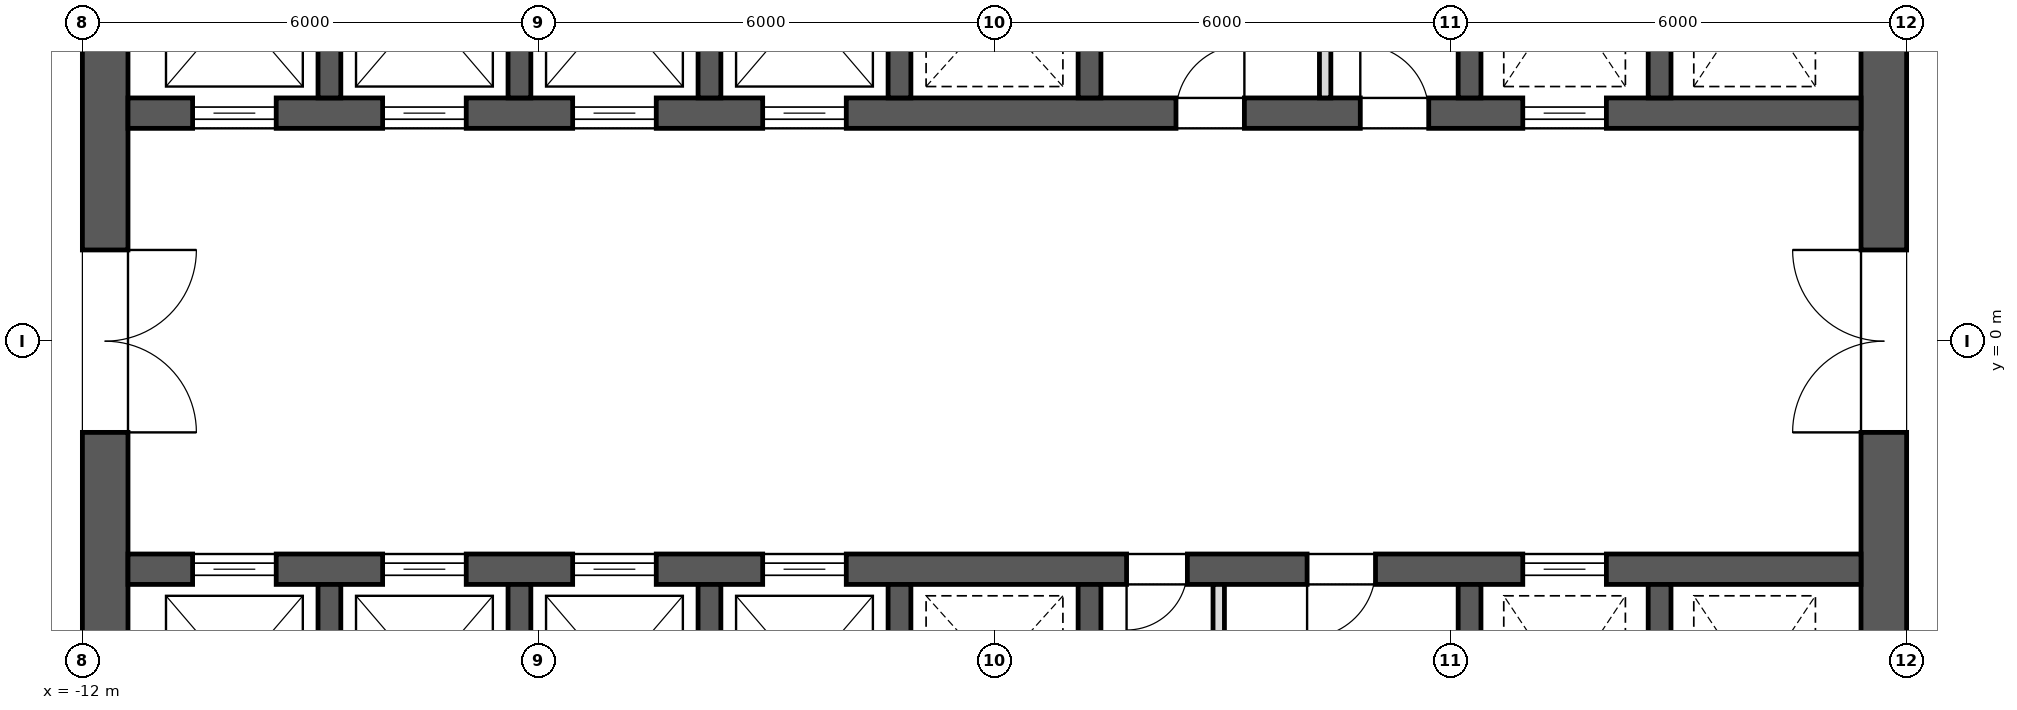
"""IFC4 building model, lengths in metres.
Left out: names, types, materials, properties, quantities, classifications, styles, units other than length and angle.
Written with IfcOpenShell. Run it as: python <this file> out.ifc"""

import sys

from ifc_helpers import new_model, si_unit, direction, frame, frame_2d, origin, place, context, subcontext, project, spatial, rectangle, extrude, element, fill, save


model = new_model("IFC4")
c1 = context("Model", 3, precision=1e-05, world=origin(), true_north=direction((0.0, 1.0)))
c2 = subcontext(c1, "Body", "Model", "MODEL_VIEW")
j1 = project(units=[si_unit("LENGTHUNIT", "METRE"), si_unit("PLANEANGLEUNIT", "RADIAN")], contexts=[c1])
p1 = place(None, origin())
s1 = spatial("IfcSite", under=j1, at=p1, CompositionType="ELEMENT")
p2 = place(p1, origin())
s2 = spatial("IfcBuilding", under=s1, at=p2, CompositionType="ELEMENT")
p3 = place(p2, frame((0.0, 0.0, 222.9)))
s3 = spatial("IfcBuildingStorey", under=s2, at=p3, CompositionType="ELEMENT", Elevation=222.9)
p4 = place(p3, frame((11.7, -11.4, 0.0), z_axis=(0.0, 0.0, 1.0), x_axis=(0.0, 1.0, 0.0)))
e1 = element("IfcWall", 1, at=p4, inside=s3, PredefinedType="SHEAR", context=c2, shape_type="SweptSolid", body=[
    extrude(rectangle(XDim=22.8, YDim=0.6, at=frame_2d((11.4, 0.0))), origin(), (0.0, 0.0, 1.0), 4.0),
])
p5 = place(p4, frame((10.2, 0.0, 0.0)))
e2 = element("IfcOpeningElement", 2, at=p5, cuts=e1, PredefinedType="OPENING", context=c2, shape_type="SweptSolid", body=[
    extrude(rectangle(XDim=2.4, YDim=2.1, at=frame_2d((1.2, 1.05))), frame((0.0, 0.312, 0.0), z_axis=(0.0, -1.0, 0.0), x_axis=(1.0, 0.0, 0.0)), (0.0, 0.0, 1.0), 0.624),
])
p6 = place(p4, frame((19.5, 0.0, 0.0)))
e3 = element("IfcOpeningElement", 3, at=p6, cuts=e1, PredefinedType="OPENING", context=c2, shape_type="SweptSolid", body=[
    extrude(rectangle(XDim=1.2, YDim=2.1, at=frame_2d((0.6, 1.05))), frame((0.0, 0.312, 0.0), z_axis=(0.0, -1.0, 0.0), x_axis=(1.0, 0.0, 0.0)), (0.0, 0.0, 1.0), 0.624),
])
p7 = place(p4, frame((2.1, 0.0, 0.0)))
e4 = element("IfcOpeningElement", 4, at=p7, cuts=e1, PredefinedType="OPENING", context=c2, shape_type="SweptSolid", body=[
    extrude(rectangle(XDim=1.2, YDim=2.1, at=frame_2d((0.6, 1.05))), frame((0.0, 0.312, 0.0), z_axis=(0.0, -1.0, 0.0), x_axis=(1.0, 0.0, 0.0)), (0.0, 0.0, 1.0), 0.624),
])
p8 = place(p3, frame((-11.7, -11.4, 0.0), z_axis=(0.0, 0.0, 1.0), x_axis=(0.0, 1.0, 0.0)))
e5 = element("IfcWall", 5, at=p8, inside=s3, PredefinedType="SHEAR", context=c2, shape_type="SweptSolid", body=[
    extrude(rectangle(XDim=22.8, YDim=0.6, at=frame_2d((11.4, 0.0))), origin(), (0.0, 0.0, 1.0), 4.0),
])
p9 = place(p8, frame((10.2, 0.0, 0.0)))
e6 = element("IfcOpeningElement", 6, at=p9, cuts=e5, PredefinedType="OPENING", context=c2, shape_type="SweptSolid", body=[
    extrude(rectangle(XDim=2.4, YDim=2.1, at=frame_2d((1.2, 1.05))), frame((0.0, 0.312, 0.0), z_axis=(0.0, -1.0, 0.0), x_axis=(1.0, 0.0, 0.0)), (0.0, 0.0, 1.0), 0.624),
])
p10 = place(p8, frame((18.925, 0.0, 0.0)))
e7 = element("IfcOpeningElement", 7, at=p10, cuts=e5, PredefinedType="OPENING", context=c2, shape_type="SweptSolid", body=[
    extrude(rectangle(XDim=1.2, YDim=2.1, at=frame_2d((0.6, 1.05))), frame((0.0, 0.312, 0.0), z_axis=(0.0, -1.0, 0.0), x_axis=(1.0, 0.0, 0.0)), (0.0, 0.0, 1.0), 0.624),
])
p11 = place(p8, frame((2.675, 0.0, 0.0)))
e8 = element("IfcOpeningElement", 8, at=p11, cuts=e5, PredefinedType="OPENING", context=c2, shape_type="SweptSolid", body=[
    extrude(rectangle(XDim=1.2, YDim=2.1, at=frame_2d((0.6, 1.05))), frame((0.0, 0.312, 0.0), z_axis=(0.0, -1.0, 0.0), x_axis=(1.0, 0.0, 0.0)), (0.0, 0.0, 1.0), 0.624),
])
p12 = place(p3, frame((-11.4, 3.0, 0.0), z_axis=(0.0, 0.0, 1.0), x_axis=(1.0, 0.0, 0.0)))
e9 = element("IfcWall", 9, at=p12, inside=s3, PredefinedType="SHEAR", context=c2, shape_type="SweptSolid", body=[
    extrude(rectangle(XDim=22.8, YDim=0.4, at=frame_2d((11.4, 0.0))), origin(), (0.0, 0.0, 1.0), 4.0),
])
p13 = place(p12, frame((0.85, 0.0, 0.0)))
e10 = element("IfcOpeningElement", 10, at=p13, cuts=e9, PredefinedType="OPENING", context=c2, shape_type="SweptSolid", body=[
    extrude(rectangle(XDim=1.1, YDim=2.1, at=frame_2d((0.55, 1.05))), frame((0.0, 0.212, 0.0), z_axis=(0.0, -1.0, 0.0), x_axis=(1.0, 0.0, 0.0)), (0.0, 0.0, 1.0), 0.424),
])
p14 = place(p12, frame((3.35, 0.0, 0.0)))
e11 = element("IfcOpeningElement", 11, at=p14, cuts=e9, PredefinedType="OPENING", context=c2, shape_type="SweptSolid", body=[
    extrude(rectangle(XDim=1.1, YDim=2.1, at=frame_2d((0.55, 1.05))), frame((0.0, 0.212, 0.0), z_axis=(0.0, -1.0, 0.0), x_axis=(1.0, 0.0, 0.0)), (0.0, 0.0, 1.0), 0.424),
])
p15 = place(p12, frame((5.85, 0.0, 0.0)))
e12 = element("IfcOpeningElement", 12, at=p15, cuts=e9, PredefinedType="OPENING", context=c2, shape_type="SweptSolid", body=[
    extrude(rectangle(XDim=1.1, YDim=2.1, at=frame_2d((0.55, 1.05))), frame((0.0, 0.212, 0.0), z_axis=(0.0, -1.0, 0.0), x_axis=(1.0, 0.0, 0.0)), (0.0, 0.0, 1.0), 0.424),
])
p16 = place(p12, frame((8.35, 0.0, 0.0)))
e13 = element("IfcOpeningElement", 13, at=p16, cuts=e9, PredefinedType="OPENING", context=c2, shape_type="SweptSolid", body=[
    extrude(rectangle(XDim=1.1, YDim=2.1, at=frame_2d((0.55, 1.05))), frame((0.0, 0.212, 0.0), z_axis=(0.0, -1.0, 0.0), x_axis=(1.0, 0.0, 0.0)), (0.0, 0.0, 1.0), 0.424),
])
p17 = place(p12, frame((18.35, 0.0, 0.0)))
e14 = element("IfcOpeningElement", 14, at=p17, cuts=e9, PredefinedType="OPENING", context=c2, shape_type="SweptSolid", body=[
    extrude(rectangle(XDim=1.1, YDim=2.1, at=frame_2d((0.55, 1.05))), frame((0.0, 0.212, 0.0), z_axis=(0.0, -1.0, 0.0), x_axis=(1.0, 0.0, 0.0)), (0.0, 0.0, 1.0), 0.424),
])
p18 = place(p12, frame((13.788, 0.0, 0.0)))
e15 = element("IfcOpeningElement", 15, at=p18, cuts=e9, PredefinedType="OPENING", context=c2, shape_type="SweptSolid", body=[
    extrude(rectangle(XDim=0.9, YDim=2.1, at=frame_2d((0.45, 1.05))), frame((0.0, 0.212, 0.0), z_axis=(0.0, -1.0, 0.0), x_axis=(1.0, 0.0, 0.0)), (0.0, 0.0, 1.0), 0.424),
])
p19 = place(p12, frame((16.212, 0.0, 0.0)))
e16 = element("IfcOpeningElement", 16, at=p19, cuts=e9, PredefinedType="OPENING", context=c2, shape_type="SweptSolid", body=[
    extrude(rectangle(XDim=0.9, YDim=2.1, at=frame_2d((0.45, 1.05))), frame((0.0, 0.212, 0.0), z_axis=(0.0, -1.0, 0.0), x_axis=(1.0, 0.0, 0.0)), (0.0, 0.0, 1.0), 0.424),
])
for number, where, z_axis, x_axis in (
    (17, (-8.75, 3.2, 0.0), (0.0, 0.0, 1.0), (0.0, 1.0, 0.0)),
    (18, (-6.25, 3.2, 0.0), (0.0, 0.0, 1.0), (0.0, 1.0, 0.0)),
    (19, (-3.75, 3.2, 0.0), (0.0, 0.0, 1.0), (0.0, 1.0, 0.0)),
    (20, (-1.25, 3.2, 0.0), (0.0, 0.0, 1.0), (0.0, 1.0, 0.0)),
    (21, (1.25, 3.2, 0.0), (0.0, 0.0, 1.0), (0.0, 1.0, 0.0)),
    (22, (6.25, 3.2, 0.0), (0.0, 0.0, 1.0), (0.0, 1.0, 0.0)),
    (23, (8.75, 3.2, 0.0), (0.0, 0.0, 1.0), (0.0, 1.0, 0.0)),
):
    element("IfcWall", number, at=place(p3, frame(where, z_axis=z_axis, x_axis=x_axis)), inside=s3, PredefinedType="SHEAR", context=c2, shape_type="SweptSolid", body=[
        extrude(rectangle(XDim=2.9, YDim=0.3, at=frame_2d((1.45, 0.0))), origin(), (0.0, 0.0, 1.0), 4.0),
    ])
p20 = place(p3, frame((-11.4, -3.0, 0.0), z_axis=(0.0, 0.0, 1.0), x_axis=(1.0, 0.0, 0.0)))
e24 = element("IfcWall", 24, at=p20, inside=s3, PredefinedType="SHEAR", context=c2, shape_type="SweptSolid", body=[
    extrude(rectangle(XDim=22.8, YDim=0.4, at=frame_2d((11.4, 0.0))), origin(), (0.0, 0.0, 1.0), 4.0),
])
p21 = place(p20, frame((0.85, 0.0, 0.0)))
e25 = element("IfcOpeningElement", 25, at=p21, cuts=e24, PredefinedType="OPENING", context=c2, shape_type="SweptSolid", body=[
    extrude(rectangle(XDim=1.1, YDim=2.1, at=frame_2d((0.55, 1.05))), frame((0.0, 0.212, 0.0), z_axis=(0.0, -1.0, 0.0), x_axis=(1.0, 0.0, 0.0)), (0.0, 0.0, 1.0), 0.424),
])
p22 = place(p20, frame((3.35, 0.0, 0.0)))
e26 = element("IfcOpeningElement", 26, at=p22, cuts=e24, PredefinedType="OPENING", context=c2, shape_type="SweptSolid", body=[
    extrude(rectangle(XDim=1.1, YDim=2.1, at=frame_2d((0.55, 1.05))), frame((0.0, 0.212, 0.0), z_axis=(0.0, -1.0, 0.0), x_axis=(1.0, 0.0, 0.0)), (0.0, 0.0, 1.0), 0.424),
])
p23 = place(p20, frame((5.85, 0.0, 0.0)))
e27 = element("IfcOpeningElement", 27, at=p23, cuts=e24, PredefinedType="OPENING", context=c2, shape_type="SweptSolid", body=[
    extrude(rectangle(XDim=1.1, YDim=2.1, at=frame_2d((0.55, 1.05))), frame((0.0, 0.212, 0.0), z_axis=(0.0, -1.0, 0.0), x_axis=(1.0, 0.0, 0.0)), (0.0, 0.0, 1.0), 0.424),
])
p24 = place(p20, frame((8.35, 0.0, 0.0)))
e28 = element("IfcOpeningElement", 28, at=p24, cuts=e24, PredefinedType="OPENING", context=c2, shape_type="SweptSolid", body=[
    extrude(rectangle(XDim=1.1, YDim=2.1, at=frame_2d((0.55, 1.05))), frame((0.0, 0.212, 0.0), z_axis=(0.0, -1.0, 0.0), x_axis=(1.0, 0.0, 0.0)), (0.0, 0.0, 1.0), 0.424),
])
p25 = place(p20, frame((18.35, 0.0, 0.0)))
e29 = element("IfcOpeningElement", 29, at=p25, cuts=e24, PredefinedType="OPENING", context=c2, shape_type="SweptSolid", body=[
    extrude(rectangle(XDim=1.1, YDim=2.1, at=frame_2d((0.55, 1.05))), frame((0.0, 0.212, 0.0), z_axis=(0.0, -1.0, 0.0), x_axis=(1.0, 0.0, 0.0)), (0.0, 0.0, 1.0), 0.424),
])
p26 = place(p20, frame((13.137, 0.0, 0.0)))
e30 = element("IfcOpeningElement", 30, at=p26, cuts=e24, PredefinedType="OPENING", context=c2, shape_type="SweptSolid", body=[
    extrude(rectangle(XDim=0.8, YDim=2.1, at=frame_2d((0.4, 1.05))), frame((0.0, 0.212, 0.0), z_axis=(0.0, -1.0, 0.0), x_axis=(1.0, 0.0, 0.0)), (0.0, 0.0, 1.0), 0.424),
])
p27 = place(p20, frame((15.512, 0.0, 0.0)))
e31 = element("IfcOpeningElement", 31, at=p27, cuts=e24, PredefinedType="OPENING", context=c2, shape_type="SweptSolid", body=[
    extrude(rectangle(XDim=0.9, YDim=2.1, at=frame_2d((0.45, 1.05))), frame((0.0, 0.212, 0.0), z_axis=(0.0, -1.0, 0.0), x_axis=(1.0, 0.0, 0.0)), (0.0, 0.0, 1.0), 0.424),
])
for number, where, z_axis, x_axis in (
    (32, (-8.75, -6.1, 0.0), (0.0, 0.0, 1.0), (0.0, 1.0, 0.0)),
    (33, (-6.25, -6.1, 0.0), (0.0, 0.0, 1.0), (0.0, 1.0, 0.0)),
    (34, (-3.75, -6.1, 0.0), (0.0, 0.0, 1.0), (0.0, 1.0, 0.0)),
    (35, (-1.25, -6.1, 0.0), (0.0, 0.0, 1.0), (0.0, 1.0, 0.0)),
    (36, (1.25, -6.1, 0.0), (0.0, 0.0, 1.0), (0.0, 1.0, 0.0)),
    (37, (6.25, -6.1, 0.0), (0.0, 0.0, 1.0), (0.0, 1.0, 0.0)),
    (38, (8.75, -6.1, 0.0), (0.0, 0.0, 1.0), (0.0, 1.0, 0.0)),
):
    element("IfcWall", number, at=place(p3, frame(where, z_axis=z_axis, x_axis=x_axis)), inside=s3, PredefinedType="SHEAR", context=c2, shape_type="SweptSolid", body=[
        extrude(rectangle(XDim=2.9, YDim=0.3, at=frame_2d((1.45, 0.0))), origin(), (0.0, 0.0, 1.0), 4.0),
    ])
for number, where, z_axis, x_axis in (
    (39, (4.35, 3.2, 0.0), (0.0, 0.0, 1.0), (0.0, 1.0, 0.0)),
    (40, (2.95, -6.1, 0.0), (0.0, 0.0, 1.0), (0.0, 1.0, 0.0)),
):
    element("IfcWall", number, at=place(p3, frame(where, z_axis=z_axis, x_axis=x_axis)), inside=s3, PredefinedType="PARTITIONING", context=c2, shape_type="SweptSolid", body=[
        extrude(rectangle(XDim=2.9, YDim=0.15, at=frame_2d((1.45, 0.0))), origin(), (0.0, 0.0, 1.0), 3.7),
    ])
p28 = place(p13, origin())
e41 = element("IfcDoor", 41, at=p28, inside=s3, OperationType="SLIDING_TO_LEFT", PredefinedType="DOOR", context=c2, shape_type="SweptSolid", body=[
    extrude(rectangle(XDim=1.1, YDim=2.1, at=frame_2d((0.55, 1.05))), frame((0.0, 0.025, 0.0), z_axis=(0.0, -1.0, 0.0), x_axis=(1.0, 0.0, 0.0)), (0.0, 0.0, 1.0), 0.05),
])
fill(e10, e41)
p29 = place(p14, origin())
e42 = element("IfcDoor", 42, at=p29, inside=s3, OperationType="SLIDING_TO_LEFT", PredefinedType="DOOR", context=c2, shape_type="SweptSolid", body=[
    extrude(rectangle(XDim=1.1, YDim=2.1, at=frame_2d((0.55, 1.05))), frame((0.0, 0.025, 0.0), z_axis=(0.0, -1.0, 0.0), x_axis=(1.0, 0.0, 0.0)), (0.0, 0.0, 1.0), 0.05),
])
fill(e11, e42)
p30 = place(p21, origin())
e43 = element("IfcDoor", 43, at=p30, inside=s3, OperationType="SLIDING_TO_LEFT", PredefinedType="DOOR", context=c2, shape_type="SweptSolid", body=[
    extrude(rectangle(XDim=1.1, YDim=2.1, at=frame_2d((0.55, 1.05))), frame((0.0, 0.025, 0.0), z_axis=(0.0, -1.0, 0.0), x_axis=(1.0, 0.0, 0.0)), (0.0, 0.0, 1.0), 0.05),
])
fill(e25, e43)
p31 = place(p22, origin())
e44 = element("IfcDoor", 44, at=p31, inside=s3, OperationType="SLIDING_TO_LEFT", PredefinedType="DOOR", context=c2, shape_type="SweptSolid", body=[
    extrude(rectangle(XDim=1.1, YDim=2.1, at=frame_2d((0.55, 1.05))), frame((0.0, 0.025, 0.0), z_axis=(0.0, -1.0, 0.0), x_axis=(1.0, 0.0, 0.0)), (0.0, 0.0, 1.0), 0.05),
])
fill(e26, e44)
p32 = place(p15, origin())
e45 = element("IfcDoor", 45, at=p32, inside=s3, OperationType="SLIDING_TO_LEFT", PredefinedType="DOOR", context=c2, shape_type="SweptSolid", body=[
    extrude(rectangle(XDim=1.1, YDim=2.1, at=frame_2d((0.55, 1.05))), frame((0.0, 0.025, 0.0), z_axis=(0.0, -1.0, 0.0), x_axis=(1.0, 0.0, 0.0)), (0.0, 0.0, 1.0), 0.05),
])
fill(e12, e45)
p33 = place(p16, origin())
e46 = element("IfcDoor", 46, at=p33, inside=s3, OperationType="SLIDING_TO_LEFT", PredefinedType="DOOR", context=c2, shape_type="SweptSolid", body=[
    extrude(rectangle(XDim=1.1, YDim=2.1, at=frame_2d((0.55, 1.05))), frame((0.0, 0.025, 0.0), z_axis=(0.0, -1.0, 0.0), x_axis=(1.0, 0.0, 0.0)), (0.0, 0.0, 1.0), 0.05),
])
fill(e13, e46)
p34 = place(p23, origin())
e47 = element("IfcDoor", 47, at=p34, inside=s3, OperationType="SLIDING_TO_LEFT", PredefinedType="DOOR", context=c2, shape_type="SweptSolid", body=[
    extrude(rectangle(XDim=1.1, YDim=2.1, at=frame_2d((0.55, 1.05))), frame((0.0, 0.025, 0.0), z_axis=(0.0, -1.0, 0.0), x_axis=(1.0, 0.0, 0.0)), (0.0, 0.0, 1.0), 0.05),
])
fill(e27, e47)
p35 = place(p24, origin())
e48 = element("IfcDoor", 48, at=p35, inside=s3, OperationType="SLIDING_TO_LEFT", PredefinedType="DOOR", context=c2, shape_type="SweptSolid", body=[
    extrude(rectangle(XDim=1.1, YDim=2.1, at=frame_2d((0.55, 1.05))), frame((0.0, 0.025, 0.0), z_axis=(0.0, -1.0, 0.0), x_axis=(1.0, 0.0, 0.0)), (0.0, 0.0, 1.0), 0.05),
])
fill(e28, e48)
p36 = place(p17, origin())
e49 = element("IfcDoor", 49, at=p36, inside=s3, OperationType="SLIDING_TO_LEFT", PredefinedType="DOOR", context=c2, shape_type="SweptSolid", body=[
    extrude(rectangle(XDim=1.1, YDim=2.1, at=frame_2d((0.55, 1.05))), frame((0.0, 0.025, 0.0), z_axis=(0.0, -1.0, 0.0), x_axis=(1.0, 0.0, 0.0)), (0.0, 0.0, 1.0), 0.05),
])
fill(e14, e49)
p37 = place(p25, origin())
e50 = element("IfcDoor", 50, at=p37, inside=s3, OperationType="SLIDING_TO_LEFT", PredefinedType="DOOR", context=c2, shape_type="SweptSolid", body=[
    extrude(rectangle(XDim=1.1, YDim=2.1, at=frame_2d((0.55, 1.05))), frame((0.0, 0.025, 0.0), z_axis=(0.0, -1.0, 0.0), x_axis=(1.0, 0.0, 0.0)), (0.0, 0.0, 1.0), 0.05),
])
fill(e29, e50)
p38 = place(p9, frame((2.4, 0.0, 0.0), z_axis=(0.0, 0.0, 1.0), x_axis=(-1.0, 0.0, 0.0)))
e51 = element("IfcDoor", 51, at=p38, inside=s3, OperationType="DOUBLE_DOOR_SINGLE_SWING", PredefinedType="DOOR", context=c2, shape_type="SweptSolid", body=[
    extrude(rectangle(XDim=2.4, YDim=2.1, at=frame_2d((1.2, 1.05))), frame((0.0, 0.025, 0.0), z_axis=(0.0, -1.0, 0.0), x_axis=(1.0, 0.0, 0.0)), (0.0, 0.0, 1.0), 0.05),
])
fill(e6, e51)
p39 = place(p5, origin())
e52 = element("IfcDoor", 52, at=p39, inside=s3, OperationType="DOUBLE_DOOR_SINGLE_SWING", PredefinedType="DOOR", context=c2, shape_type="SweptSolid", body=[
    extrude(rectangle(XDim=2.4, YDim=2.1, at=frame_2d((1.2, 1.05))), frame((0.0, 0.025, 0.0), z_axis=(0.0, -1.0, 0.0), x_axis=(1.0, 0.0, 0.0)), (0.0, 0.0, 1.0), 0.05),
])
fill(e2, e52)
p40 = place(p18, origin())
e53 = element("IfcDoor", 53, at=p40, inside=s3, OperationType="SINGLE_SWING_LEFT", PredefinedType="DOOR", context=c2, shape_type="SweptSolid", body=[
    extrude(rectangle(XDim=0.9, YDim=2.1, at=frame_2d((0.45, 1.05))), frame((0.0, 0.025, 0.0), z_axis=(0.0, -1.0, 0.0), x_axis=(1.0, 0.0, 0.0)), (0.0, 0.0, 1.0), 0.05),
])
fill(e15, e53)
p41 = place(p19, origin())
e54 = element("IfcDoor", 54, at=p41, inside=s3, OperationType="SINGLE_SWING_RIGHT", PredefinedType="DOOR", context=c2, shape_type="SweptSolid", body=[
    extrude(rectangle(XDim=0.9, YDim=2.1, at=frame_2d((0.45, 1.05))), frame((0.0, 0.025, 0.0), z_axis=(0.0, -1.0, 0.0), x_axis=(1.0, 0.0, 0.0)), (0.0, 0.0, 1.0), 0.05),
])
fill(e16, e54)
p42 = place(p26, frame((0.8, 0.0, 0.0), z_axis=(0.0, 0.0, 1.0), x_axis=(-1.0, 0.0, 0.0)))
e55 = element("IfcDoor", 55, at=p42, inside=s3, OperationType="SINGLE_SWING_LEFT", PredefinedType="DOOR", context=c2, shape_type="SweptSolid", body=[
    extrude(rectangle(XDim=0.8, YDim=2.1, at=frame_2d((0.4, 1.05))), frame((0.0, 0.025, 0.0), z_axis=(0.0, -1.0, 0.0), x_axis=(1.0, 0.0, 0.0)), (0.0, 0.0, 1.0), 0.05),
])
fill(e30, e55)
p43 = place(p27, frame((0.9, 0.0, 0.0), z_axis=(0.0, 0.0, 1.0), x_axis=(-1.0, 0.0, 0.0)))
e56 = element("IfcDoor", 56, at=p43, inside=s3, OperationType="SINGLE_SWING_LEFT", PredefinedType="DOOR", context=c2, shape_type="SweptSolid", body=[
    extrude(rectangle(XDim=0.9, YDim=2.1, at=frame_2d((0.45, 1.05))), frame((0.0, 0.025, 0.0), z_axis=(0.0, -1.0, 0.0), x_axis=(1.0, 0.0, 0.0)), (0.0, 0.0, 1.0), 0.05),
])
fill(e31, e56)
save(model, sys.argv[1])
